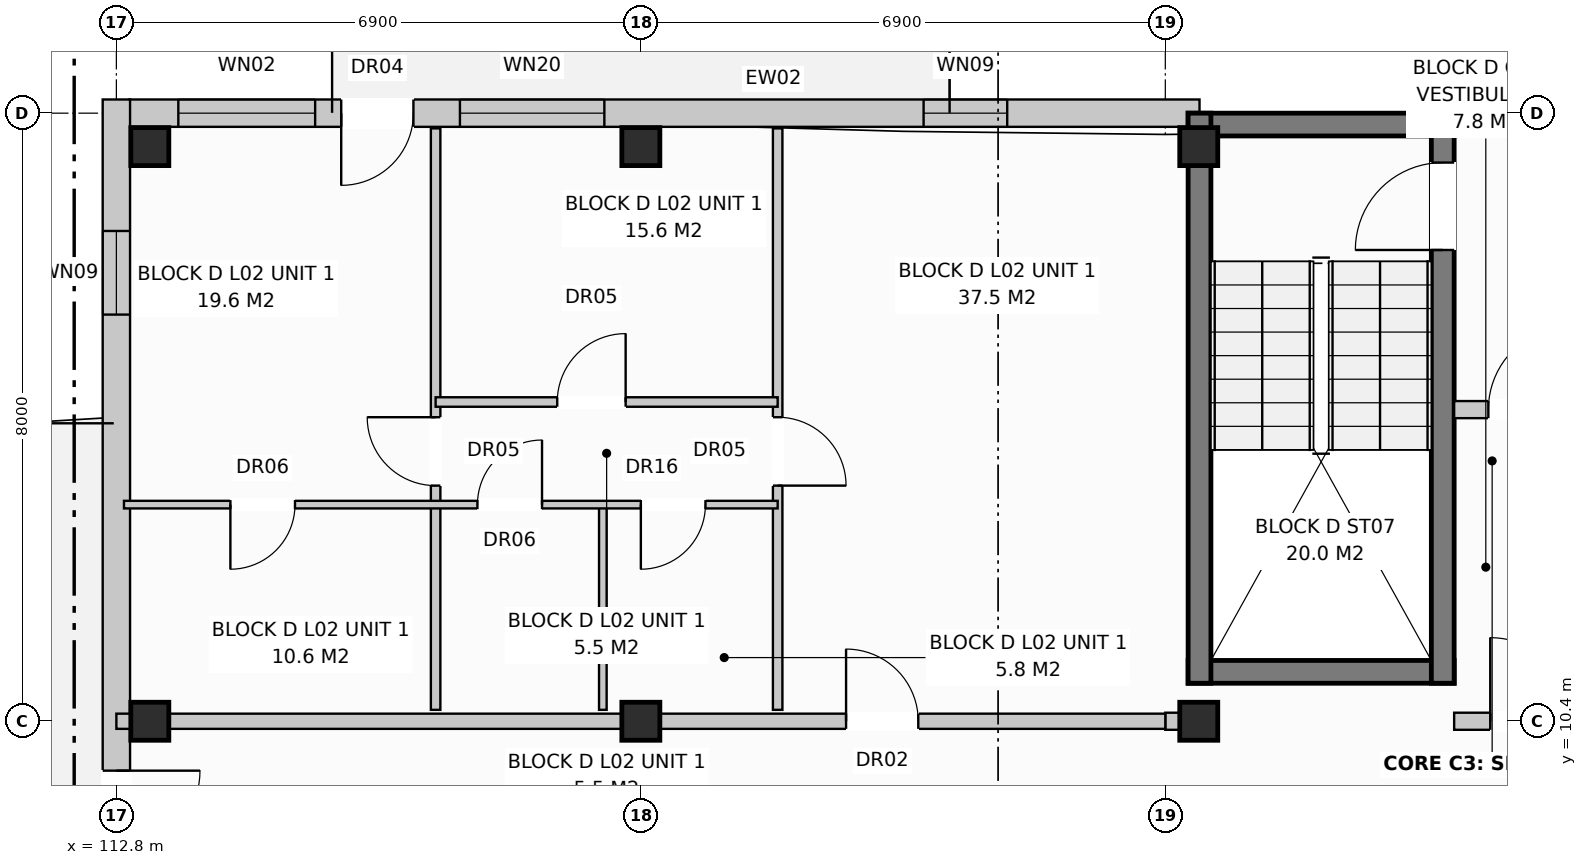
"""IFC4 building model, lengths in metres.
Left out: names, types, materials, properties, quantities, classifications, styles, units other than length and angle.
Written with IfcOpenShell. Run it as: python <this file> out.ifc"""

import sys

from ifc_helpers import new_model, si_unit, direction, frame, frame_2d, origin, origin_with_axes, origin_2d, place, context, subcontext, project, spatial, rectangle, extrude, element, fill, save


model = new_model("IFC4")
c1 = context("Model", 3, precision=1e-05, world=origin(), true_north=direction((0.0, 1.0)))
c2 = subcontext(c1, "Body", "Model", "MODEL_VIEW")
j1 = project(units=[si_unit("LENGTHUNIT", "METRE"), si_unit("PLANEANGLEUNIT", "RADIAN")], contexts=[c1])
p1 = place(None, origin())
s1 = spatial("IfcSite", under=j1, at=p1, CompositionType="ELEMENT")
p2 = place(p1, origin())
s2 = spatial("IfcBuilding", under=s1, at=p2, CompositionType="ELEMENT")
p3 = place(p2, frame((0.0, 0.0, 8.0)))
s3 = spatial("IfcBuildingStorey", under=s2, at=p3, CompositionType="ELEMENT", Elevation=8.0)
for number, where, z_axis, x_axis in (
    (1, (113.24, 10.4, 0.0), (0.0, 0.0, 1.0), (1.0, 0.0, 0.0)),
    (2, (113.24, 17.96, 0.0), (0.0, 0.0, 1.0), (1.0, 0.0, 0.0)),
    (3, (119.7, 10.4, 0.0), (0.0, 0.0, 1.0), (1.0, 0.0, 0.0)),
    (4, (119.7, 17.96, 0.0), (0.0, 0.0, 1.0), (1.0, 0.0, 0.0)),
    (5, (127.04, 10.4, 0.0), (0.0, 0.0, 1.0), (1.0, 0.0, 0.0)),
    (6, (127.04, 17.96, 0.0), (0.0, 0.0, 1.0), (1.0, 0.0, 0.0)),
):
    element("IfcColumn", number, at=place(p3, frame(where, z_axis=z_axis, x_axis=x_axis)), inside=s3, PredefinedType="COLUMN", context=c2, shape_type="SweptSolid", body=[
        extrude(rectangle(XDim=0.5, YDim=0.5, at=origin_2d()), origin(), (0.0, 0.0, 1.0), 3.2),
    ])
p4 = place(p3, frame((112.97, 18.4, 0.0), z_axis=(0.0, 0.0, 1.0), x_axis=(1.0, 0.0, 0.0)))
e7 = element("IfcWall", 7, at=p4, inside=s3, PredefinedType="STANDARD", context=c2, shape_type="SweptSolid", body=[
    extrude(rectangle(XDim=14.08, YDim=0.36, at=frame_2d((7.04, 0.0))), origin(), (0.0, 0.0, 1.0), 2.94),
])
p5 = place(p4, frame((2.788, 0.0, 0.0)))
e8 = element("IfcOpeningElement", 8, at=p5, cuts=e7, PredefinedType="OPENING", context=c2, shape_type="SweptSolid", body=[
    extrude(rectangle(XDim=0.95, YDim=2.1, at=frame_2d((0.475, 1.05))), frame((0.0, 0.192, 0.0), z_axis=(0.0, -1.0, 0.0), x_axis=(1.0, 0.0, 0.0)), (0.0, 0.0, 1.0), 0.384),
])
p6 = place(p4, frame((0.645, 0.0, 0.8)))
e9 = element("IfcOpeningElement", 9, at=p6, cuts=e7, PredefinedType="OPENING", context=c2, shape_type="SweptSolid", body=[
    extrude(rectangle(XDim=1.8, YDim=1.7, at=frame_2d((0.9, 0.85))), frame((0.0, 0.192, 0.0), z_axis=(0.0, -1.0, 0.0), x_axis=(1.0, 0.0, 0.0)), (0.0, 0.0, 1.0), 0.384),
])
p7 = place(p4, frame((4.35, 0.0, 0.72)))
e10 = element("IfcOpeningElement", 10, at=p7, cuts=e7, PredefinedType="OPENING", context=c2, shape_type="SweptSolid", body=[
    extrude(rectangle(XDim=1.9, YDim=1.85, at=frame_2d((0.95, 0.925))), frame((0.0, 0.192, 0.0), z_axis=(0.0, -1.0, 0.0), x_axis=(1.0, 0.0, 0.0)), (0.0, 0.0, 1.0), 0.384),
])
p8 = place(p4, frame((10.45, 0.0, 0.72)))
e11 = element("IfcOpeningElement", 11, at=p8, cuts=e7, PredefinedType="OPENING", context=c2, shape_type="SweptSolid", body=[
    extrude(rectangle(XDim=1.1, YDim=1.5, at=frame_2d((0.55, 0.75))), frame((0.0, 0.192, 0.0), z_axis=(0.0, -1.0, 0.0), x_axis=(1.0, 0.0, 0.0)), (0.0, 0.0, 1.0), 0.384),
])
p9 = place(p3, frame((130.25, 18.4, 0.0), z_axis=(0.0, 0.0, 1.0), x_axis=(1.0, 0.0, 0.0)))
e12 = element("IfcWall", 12, at=p9, inside=s3, PredefinedType="STANDARD", context=c2, shape_type="SweptSolid", body=[
    extrude(rectangle(XDim=17.5, YDim=0.36, at=frame_2d((8.75, 0.0))), origin(), (0.0, 0.0, 1.0), 2.94),
])
p10 = place(p9, frame((11.966, 0.0, 0.0)))
e13 = element("IfcOpeningElement", 13, at=p10, cuts=e12, PredefinedType="OPENING", context=c2, shape_type="SweptSolid", body=[
    extrude(rectangle(XDim=0.95, YDim=2.1, at=frame_2d((0.475, 1.05))), frame((0.0, 0.192, 0.0), z_axis=(0.0, -1.0, 0.0), x_axis=(1.0, 0.0, 0.0)), (0.0, 0.0, 1.0), 0.384),
])
p11 = place(p9, frame((14.97, 0.0, 0.72)))
e14 = element("IfcOpeningElement", 14, at=p11, cuts=e12, PredefinedType="OPENING", context=c2, shape_type="SweptSolid", body=[
    extrude(rectangle(XDim=1.1, YDim=1.5, at=frame_2d((0.55, 0.75))), frame((0.0, 0.192, 0.0), z_axis=(0.0, -1.0, 0.0), x_axis=(1.0, 0.0, 0.0)), (0.0, 0.0, 1.0), 0.384),
])
p12 = place(p3, frame((112.8, -0.18, 0.0), z_axis=(0.0, 0.0, 1.0), x_axis=(0.0, 1.0, 0.0)))
e15 = element("IfcWall", 15, at=p12, inside=s3, PredefinedType="STANDARD", context=c2, shape_type="SweptSolid", body=[
    extrude(rectangle(XDim=18.76, YDim=0.36, at=frame_2d((9.38, 0.0))), origin(), (0.0, 0.0, 1.0), 2.94),
])
p13 = place(p12, frame((8.83, 0.0, 0.0)))
e16 = element("IfcOpeningElement", 16, at=p13, cuts=e15, PredefinedType="OPENING", context=c2, shape_type="SweptSolid", body=[
    extrude(rectangle(XDim=1.1, YDim=2.1, at=frame_2d((0.55, 1.05))), frame((0.0, 0.192, 0.0), z_axis=(0.0, -1.0, 0.0), x_axis=(1.0, 0.0, 0.0)), (0.0, 0.0, 1.0), 0.384),
])
p14 = place(p12, frame((1.73, 0.0, 0.72)))
e17 = element("IfcOpeningElement", 17, at=p14, cuts=e15, PredefinedType="OPENING", context=c2, shape_type="SweptSolid", body=[
    extrude(rectangle(XDim=1.1, YDim=1.5, at=frame_2d((0.55, 0.75))), frame((0.0, 0.192, 0.0), z_axis=(0.0, -1.0, 0.0), x_axis=(1.0, 0.0, 0.0)), (0.0, 0.0, 1.0), 0.384),
])
p15 = place(p12, frame((15.93, 0.0, 0.72)))
e18 = element("IfcOpeningElement", 18, at=p15, cuts=e15, PredefinedType="OPENING", context=c2, shape_type="SweptSolid", body=[
    extrude(rectangle(XDim=1.1, YDim=1.5, at=frame_2d((0.55, 0.75))), frame((0.0, 0.192, 0.0), z_axis=(0.0, -1.0, 0.0), x_axis=(1.0, 0.0, 0.0)), (0.0, 0.0, 1.0), 0.384),
])
for number, where, z_axis, x_axis in (
    (19, (126.9, 18.25, 0.0), (0.0, 0.0, 1.0), (1.0, 0.0, 0.0)),
    (20, (126.9, 11.05, 0.0), (0.0, 0.0, 1.0), (1.0, 0.0, 0.0)),
):
    element("IfcWall", number, at=place(p3, frame(where, z_axis=z_axis, x_axis=x_axis)), inside=s3, PredefinedType="SHEAR", context=c2, shape_type="SweptSolid", body=[
        extrude(rectangle(XDim=3.5, YDim=0.3, at=frame_2d((1.75, 0.0))), origin(), (0.0, 0.0, 1.0), 2.94),
    ])
p16 = place(p3, frame((127.05, 10.9, 0.0), z_axis=(0.0, 0.0, 1.0), x_axis=(0.0, 1.0, 0.0)))
e21 = element("IfcWall", 21, at=p16, inside=s3, PredefinedType="SHEAR", context=c2, shape_type="SweptSolid", body=[
    extrude(rectangle(XDim=7.5, YDim=0.3, at=frame_2d((3.75, 0.0))), origin(), (0.0, 0.0, 1.0), 2.94),
])
p17 = place(p3, frame((130.25, 10.9, 0.0), z_axis=(0.0, 0.0, 1.0), x_axis=(0.0, 1.0, 0.0)))
e22 = element("IfcWall", 22, at=p17, inside=s3, PredefinedType="SHEAR", context=c2, shape_type="SweptSolid", body=[
    extrude(rectangle(XDim=7.5, YDim=0.3, at=frame_2d((3.75, 0.0))), origin(), (0.0, 0.0, 1.0), 2.94),
])
p18 = place(p17, frame((5.7, 0.0, 0.0)))
e23 = element("IfcOpeningElement", 23, at=p18, cuts=e22, PredefinedType="OPENING", context=c2, shape_type="SweptSolid", body=[
    extrude(rectangle(XDim=1.15, YDim=2.15, at=frame_2d((0.575, 1.075))), frame((0.0, 0.162, 0.0), z_axis=(0.0, -1.0, 0.0), x_axis=(1.0, 0.0, 0.0)), (0.0, 0.0, 1.0), 0.324),
])
p19 = place(p3, frame((130.4, 14.5, 0.0), z_axis=(0.0, 0.0, 1.0), x_axis=(1.0, 0.0, 0.0)))
e24 = element("IfcWall", 24, at=p19, inside=s3, PredefinedType="PARTITIONING", context=c2, shape_type="SweptSolid", body=[
    extrude(rectangle(XDim=2.2, YDim=0.225, at=frame_2d((1.1, 0.0))), origin(), (0.0, 0.0, 1.0), 2.94),
])
p20 = place(p19, frame((0.45, 0.0, 0.0)))
e25 = element("IfcOpeningElement", 25, at=p20, cuts=e24, PredefinedType="OPENING", context=c2, shape_type="SweptSolid", body=[
    extrude(rectangle(XDim=1.1, YDim=2.15, at=frame_2d((0.55, 1.075))), frame((0.0, 0.125, 0.0), z_axis=(0.0, -1.0, 0.0), x_axis=(1.0, 0.0, 0.0)), (0.0, 0.0, 1.0), 0.249),
])
p21 = place(p3, frame((126.6, 10.4, 0.0), z_axis=(0.0, 0.0, 1.0), x_axis=(1.0, 0.0, 0.0)))
e26 = element("IfcWall", 26, at=p21, inside=s3, PredefinedType="PARTITIONING", context=c2, shape_type="SweptSolid", body=[
    extrude(rectangle(XDim=0.3, YDim=0.225, at=frame_2d((0.15, 0.0))), origin(), (0.0, 0.0, 1.0), 2.94),
])
p22 = place(p3, frame((130.4, 10.4, 0.0), z_axis=(0.0, 0.0, 1.0), x_axis=(1.0, 0.0, 0.0)))
e27 = element("IfcWall", 27, at=p22, inside=s3, PredefinedType="PARTITIONING", context=c2, shape_type="SweptSolid", body=[
    extrude(rectangle(XDim=10.0, YDim=0.225, at=frame_2d((5.0, 0.0))), origin(), (0.0, 0.0, 1.0), 2.38),
])
p23 = place(p22, frame((0.475, 0.0, 0.0)))
e28 = element("IfcOpeningElement", 28, at=p23, cuts=e27, PredefinedType="OPENING", context=c2, shape_type="SweptSolid", body=[
    extrude(rectangle(XDim=1.1, YDim=2.15, at=frame_2d((0.55, 1.075))), frame((0.0, 0.125, 0.0), z_axis=(0.0, -1.0, 0.0), x_axis=(1.0, 0.0, 0.0)), (0.0, 0.0, 1.0), 0.249),
])
p24 = place(p22, frame((5.85, 0.0, 0.0)))
e29 = element("IfcOpeningElement", 29, at=p24, cuts=e27, PredefinedType="OPENING", context=c2, shape_type="SweptSolid", body=[
    extrude(rectangle(XDim=0.9, YDim=2.1, at=frame_2d((0.45, 1.05))), frame((0.0, 0.125, 0.0), z_axis=(0.0, -1.0, 0.0), x_axis=(1.0, 0.0, 0.0)), (0.0, 0.0, 1.0), 0.249),
])
p25 = place(p22, frame((7.9, 0.0, 0.0)))
e30 = element("IfcOpeningElement", 30, at=p25, cuts=e27, PredefinedType="OPENING", context=c2, shape_type="SweptSolid", body=[
    extrude(rectangle(XDim=0.95, YDim=2.15, at=frame_2d((0.475, 1.075))), frame((0.0, 0.125, 0.0), z_axis=(0.0, -1.0, 0.0), x_axis=(1.0, 0.0, 0.0)), (0.0, 0.0, 1.0), 0.249),
])
p26 = place(p3, frame((112.8, 10.4, 0.0), z_axis=(0.0, 0.0, 1.0), x_axis=(1.0, 0.0, 0.0)))
e31 = element("IfcWall", 31, at=p26, inside=s3, PredefinedType="PARTITIONING", context=c2, shape_type="SweptSolid", body=[
    extrude(rectangle(XDim=13.8, YDim=0.2, at=frame_2d((6.9, 0.0))), origin(), (0.0, 0.0, 1.0), 2.38),
])
p27 = place(p26, frame((9.6, 0.0, 0.0)))
e32 = element("IfcOpeningElement", 32, at=p27, cuts=e31, PredefinedType="OPENING", context=c2, shape_type="SweptSolid", body=[
    extrude(rectangle(XDim=0.95, YDim=2.15, at=frame_2d((0.475, 1.075))), frame((0.0, 0.112, 0.0), z_axis=(0.0, -1.0, 0.0), x_axis=(1.0, 0.0, 0.0)), (0.0, 0.0, 1.0), 0.224),
])
p28 = place(p3, frame((121.5, 10.55, 0.0), z_axis=(0.0, 0.0, 1.0), x_axis=(0.0, 1.0, 0.0)))
e33 = element("IfcWall", 33, at=p28, inside=s3, PredefinedType="PARTITIONING", context=c2, shape_type="SweptSolid", body=[
    extrude(rectangle(XDim=7.65, YDim=0.125, at=frame_2d((3.825, 0.0))), origin(), (0.0, 0.0, 1.0), 2.94),
])
p29 = place(p28, frame((2.95, 0.0, 0.0)))
e34 = element("IfcOpeningElement", 34, at=p29, cuts=e33, PredefinedType="OPENING", context=c2, shape_type="SweptSolid", body=[
    extrude(rectangle(XDim=0.9, YDim=2.1, at=frame_2d((0.45, 1.05))), frame((0.0, 0.074, 0.0), z_axis=(0.0, -1.0, 0.0), x_axis=(1.0, 0.0, 0.0)), (0.0, 0.0, 1.0), 0.149),
])
p30 = place(p3, frame((117.0, 10.55, 0.0), z_axis=(0.0, 0.0, 1.0), x_axis=(0.0, 1.0, 0.0)))
e35 = element("IfcWall", 35, at=p30, inside=s3, PredefinedType="PARTITIONING", context=c2, shape_type="SweptSolid", body=[
    extrude(rectangle(XDim=7.65, YDim=0.125, at=frame_2d((3.825, 0.0))), origin(), (0.0, 0.0, 1.0), 2.94),
])
p31 = place(p30, frame((2.95, 0.0, 0.0)))
e36 = element("IfcOpeningElement", 36, at=p31, cuts=e35, PredefinedType="OPENING", context=c2, shape_type="SweptSolid", body=[
    extrude(rectangle(XDim=0.9, YDim=2.1, at=frame_2d((0.45, 1.05))), frame((0.0, 0.074, 0.0), z_axis=(0.0, -1.0, 0.0), x_axis=(1.0, 0.0, 0.0)), (0.0, 0.0, 1.0), 0.149),
])
p32 = place(p3, frame((119.2, 10.55, 0.0), z_axis=(0.0, 0.0, 1.0), x_axis=(0.0, 1.0, 0.0)))
e37 = element("IfcWall", 37, at=p32, inside=s3, PredefinedType="PARTITIONING", context=c2, shape_type="SweptSolid", body=[
    extrude(rectangle(XDim=2.7, YDim=0.1, at=frame_2d((1.35, 0.0))), origin(), (0.0, 0.0, 1.0), 2.94),
])
p33 = place(p3, frame((112.9, 13.25, 0.0), z_axis=(0.0, 0.0, 1.0), x_axis=(1.0, 0.0, 0.0)))
e38 = element("IfcWall", 38, at=p33, inside=s3, PredefinedType="PARTITIONING", context=c2, shape_type="SweptSolid", body=[
    extrude(rectangle(XDim=8.6, YDim=0.1, at=frame_2d((4.3, 0.0))), origin(), (0.0, 0.0, 1.0), 2.94),
])
p34 = place(p33, frame((1.4, 0.0, 0.0)))
e39 = element("IfcOpeningElement", 39, at=p34, cuts=e38, PredefinedType="OPENING", context=c2, shape_type="SweptSolid", body=[
    extrude(rectangle(XDim=0.85, YDim=2.05, at=frame_2d((0.425, 1.025))), frame((0.0, 0.062, 0.0), z_axis=(0.0, -1.0, 0.0), x_axis=(1.0, 0.0, 0.0)), (0.0, 0.0, 1.0), 0.124),
])
p35 = place(p33, frame((4.65, 0.0, 0.0)))
e40 = element("IfcOpeningElement", 40, at=p35, cuts=e38, PredefinedType="OPENING", context=c2, shape_type="SweptSolid", body=[
    extrude(rectangle(XDim=0.85, YDim=2.05, at=frame_2d((0.425, 1.025))), frame((0.0, 0.062, 0.0), z_axis=(0.0, -1.0, 0.0), x_axis=(1.0, 0.0, 0.0)), (0.0, 0.0, 1.0), 0.124),
])
p36 = place(p33, frame((6.8, 0.0, 0.0)))
e41 = element("IfcOpeningElement", 41, at=p36, cuts=e38, PredefinedType="OPENING", context=c2, shape_type="SweptSolid", body=[
    extrude(rectangle(XDim=0.85, YDim=2.1, at=frame_2d((0.425, 1.05))), frame((0.0, 0.062, 0.0), z_axis=(0.0, -1.0, 0.0), x_axis=(1.0, 0.0, 0.0)), (0.0, 0.0, 1.0), 0.124),
])
p37 = place(p3, frame((117.0, 14.6, 0.0), z_axis=(0.0, 0.0, 1.0), x_axis=(1.0, 0.0, 0.0)))
e42 = element("IfcWall", 42, at=p37, inside=s3, PredefinedType="PARTITIONING", context=c2, shape_type="SweptSolid", body=[
    extrude(rectangle(XDim=4.5, YDim=0.125, at=frame_2d((2.25, 0.0))), origin(), (0.0, 0.0, 1.0), 2.94),
])
p38 = place(p37, frame((1.6, 0.0, 0.0)))
e43 = element("IfcOpeningElement", 43, at=p38, cuts=e42, PredefinedType="OPENING", context=c2, shape_type="SweptSolid", body=[
    extrude(rectangle(XDim=0.9, YDim=2.1, at=frame_2d((0.45, 1.05))), frame((0.0, 0.074, 0.0), z_axis=(0.0, -1.0, 0.0), x_axis=(1.0, 0.0, 0.0)), (0.0, 0.0, 1.0), 0.149),
])
p39 = place(p5, frame((0.95, 0.0, 0.0), z_axis=(0.0, 0.0, 1.0), x_axis=(-1.0, 0.0, 0.0)))
e44 = element("IfcDoor", 44, at=p39, inside=s3, OperationType="SINGLE_SWING_LEFT", PredefinedType="DOOR", context=c2, shape_type="SweptSolid", body=[
    extrude(rectangle(XDim=0.95, YDim=2.1, at=frame_2d((0.475, 1.05))), frame((0.0, 0.025, 0.0), z_axis=(0.0, -1.0, 0.0), x_axis=(1.0, 0.0, 0.0)), (0.0, 0.0, 1.0), 0.05),
])
fill(e8, e44)
p40 = place(p6, origin_with_axes())
e45 = element("IfcWindow", 45, at=p40, inside=s3, PartitioningType="SINGLE_PANEL", PredefinedType="WINDOW", context=c2, shape_type="SweptSolid", body=[
    extrude(rectangle(XDim=1.8, YDim=1.7, at=frame_2d((0.9, 0.85))), frame((0.0, 0.03, 0.0), z_axis=(0.0, -1.0, 0.0), x_axis=(1.0, 0.0, 0.0)), (0.0, 0.0, 1.0), 0.06),
])
fill(e9, e45)
p41 = place(p7, origin_with_axes())
e46 = element("IfcWindow", 46, at=p41, inside=s3, PartitioningType="SINGLE_PANEL", PredefinedType="WINDOW", context=c2, shape_type="SweptSolid", body=[
    extrude(rectangle(XDim=1.9, YDim=1.85, at=frame_2d((0.95, 0.925))), frame((0.0, 0.03, 0.0), z_axis=(0.0, -1.0, 0.0), x_axis=(1.0, 0.0, 0.0)), (0.0, 0.0, 1.0), 0.06),
])
fill(e10, e46)
p42 = place(p8, origin_with_axes())
e47 = element("IfcWindow", 47, at=p42, inside=s3, PartitioningType="SINGLE_PANEL", PredefinedType="WINDOW", context=c2, shape_type="SweptSolid", body=[
    extrude(rectangle(XDim=1.1, YDim=1.5, at=frame_2d((0.55, 0.75))), frame((0.0, 0.03, 0.0), z_axis=(0.0, -1.0, 0.0), x_axis=(1.0, 0.0, 0.0)), (0.0, 0.0, 1.0), 0.06),
])
fill(e11, e47)
p43 = place(p13, frame((1.1, 0.0, 0.0), z_axis=(0.0, 0.0, 1.0), x_axis=(-1.0, 0.0, 0.0)))
e48 = element("IfcDoor", 48, at=p43, inside=s3, OperationType="SINGLE_SWING_RIGHT", PredefinedType="DOOR", context=c2, shape_type="SweptSolid", body=[
    extrude(rectangle(XDim=1.1, YDim=2.1, at=frame_2d((0.55, 1.05))), frame((0.0, 0.025, 0.0), z_axis=(0.0, -1.0, 0.0), x_axis=(1.0, 0.0, 0.0)), (0.0, 0.0, 1.0), 0.05),
])
fill(e16, e48)
p44 = place(p15, origin_with_axes())
e49 = element("IfcWindow", 49, at=p44, inside=s3, PartitioningType="SINGLE_PANEL", PredefinedType="WINDOW", context=c2, shape_type="SweptSolid", body=[
    extrude(rectangle(XDim=1.1, YDim=1.5, at=frame_2d((0.55, 0.75))), frame((0.0, 0.03, 0.0), z_axis=(0.0, -1.0, 0.0), x_axis=(1.0, 0.0, 0.0)), (0.0, 0.0, 1.0), 0.06),
])
fill(e18, e49)
p45 = place(p18, origin_with_axes())
e50 = element("IfcDoor", 50, at=p45, inside=s3, OperationType="SINGLE_SWING_LEFT", PredefinedType="DOOR", context=c2, shape_type="SweptSolid", body=[
    extrude(rectangle(XDim=1.15, YDim=2.15, at=frame_2d((0.575, 1.075))), frame((0.0, 0.025, 0.0), z_axis=(0.0, -1.0, 0.0), x_axis=(1.0, 0.0, 0.0)), (0.0, 0.0, 1.0), 0.05),
])
fill(e23, e50)
p46 = place(p20, origin_with_axes())
e51 = element("IfcDoor", 51, at=p46, inside=s3, OperationType="SINGLE_SWING_RIGHT", PredefinedType="DOOR", context=c2, shape_type="SweptSolid", body=[
    extrude(rectangle(XDim=1.1, YDim=2.15, at=frame_2d((0.55, 1.075))), frame((0.0, 0.025, 0.0), z_axis=(0.0, -1.0, 0.0), x_axis=(1.0, 0.0, 0.0)), (0.0, 0.0, 1.0), 0.05),
])
fill(e25, e51)
p47 = place(p23, origin_with_axes())
e52 = element("IfcDoor", 52, at=p47, inside=s3, OperationType="SINGLE_SWING_LEFT", PredefinedType="DOOR", context=c2, shape_type="SweptSolid", body=[
    extrude(rectangle(XDim=1.1, YDim=2.15, at=frame_2d((0.55, 1.075))), frame((0.0, 0.025, 0.0), z_axis=(0.0, -1.0, 0.0), x_axis=(1.0, 0.0, 0.0)), (0.0, 0.0, 1.0), 0.05),
])
fill(e28, e52)
p48 = place(p27, origin_with_axes())
e53 = element("IfcDoor", 53, at=p48, inside=s3, OperationType="SINGLE_SWING_LEFT", PredefinedType="DOOR", context=c2, shape_type="SweptSolid", body=[
    extrude(rectangle(XDim=0.95, YDim=2.15, at=frame_2d((0.475, 1.075))), frame((0.0, 0.025, 0.0), z_axis=(0.0, -1.0, 0.0), x_axis=(1.0, 0.0, 0.0)), (0.0, 0.0, 1.0), 0.05),
])
fill(e32, e53)
p49 = place(p29, frame((0.9, 0.0, 0.0), z_axis=(0.0, 0.0, 1.0), x_axis=(-1.0, 0.0, 0.0)))
e54 = element("IfcDoor", 54, at=p49, inside=s3, OperationType="SINGLE_SWING_LEFT", PredefinedType="DOOR", context=c2, shape_type="SweptSolid", body=[
    extrude(rectangle(XDim=0.9, YDim=2.1, at=frame_2d((0.45, 1.05))), frame((0.0, 0.025, 0.0), z_axis=(0.0, -1.0, 0.0), x_axis=(1.0, 0.0, 0.0)), (0.0, 0.0, 1.0), 0.05),
])
fill(e34, e54)
p50 = place(p31, origin_with_axes())
e55 = element("IfcDoor", 55, at=p50, inside=s3, OperationType="SINGLE_SWING_RIGHT", PredefinedType="DOOR", context=c2, shape_type="SweptSolid", body=[
    extrude(rectangle(XDim=0.9, YDim=2.1, at=frame_2d((0.45, 1.05))), frame((0.0, 0.025, 0.0), z_axis=(0.0, -1.0, 0.0), x_axis=(1.0, 0.0, 0.0)), (0.0, 0.0, 1.0), 0.05),
])
fill(e36, e55)
p51 = place(p34, frame((0.85, 0.0, 0.0), z_axis=(0.0, 0.0, 1.0), x_axis=(-1.0, 0.0, 0.0)))
e56 = element("IfcDoor", 56, at=p51, inside=s3, OperationType="SINGLE_SWING_LEFT", PredefinedType="DOOR", context=c2, shape_type="SweptSolid", body=[
    extrude(rectangle(XDim=0.85, YDim=2.05, at=frame_2d((0.425, 1.025))), frame((0.0, 0.025, 0.0), z_axis=(0.0, -1.0, 0.0), x_axis=(1.0, 0.0, 0.0)), (0.0, 0.0, 1.0), 0.05),
])
fill(e39, e56)
p52 = place(p35, origin_with_axes())
e57 = element("IfcDoor", 57, at=p52, inside=s3, OperationType="SINGLE_SWING_RIGHT", PredefinedType="DOOR", context=c2, shape_type="SweptSolid", body=[
    extrude(rectangle(XDim=0.85, YDim=2.05, at=frame_2d((0.425, 1.025))), frame((0.0, 0.025, 0.0), z_axis=(0.0, -1.0, 0.0), x_axis=(1.0, 0.0, 0.0)), (0.0, 0.0, 1.0), 0.05),
])
fill(e40, e57)
p53 = place(p36, frame((0.85, 0.0, 0.0), z_axis=(0.0, 0.0, 1.0), x_axis=(-1.0, 0.0, 0.0)))
e58 = element("IfcDoor", 58, at=p53, inside=s3, OperationType="SINGLE_SWING_LEFT", PredefinedType="DOOR", context=c2, shape_type="SweptSolid", body=[
    extrude(rectangle(XDim=0.85, YDim=2.1, at=frame_2d((0.425, 1.05))), frame((0.0, 0.025, 0.0), z_axis=(0.0, -1.0, 0.0), x_axis=(1.0, 0.0, 0.0)), (0.0, 0.0, 1.0), 0.05),
])
fill(e41, e58)
p54 = place(p38, origin_with_axes())
e59 = element("IfcDoor", 59, at=p54, inside=s3, OperationType="SINGLE_SWING_RIGHT", PredefinedType="DOOR", context=c2, shape_type="SweptSolid", body=[
    extrude(rectangle(XDim=0.9, YDim=2.1, at=frame_2d((0.45, 1.05))), frame((0.0, 0.025, 0.0), z_axis=(0.0, -1.0, 0.0), x_axis=(1.0, 0.0, 0.0)), (0.0, 0.0, 1.0), 0.05),
])
fill(e43, e59)
save(model, sys.argv[1])
